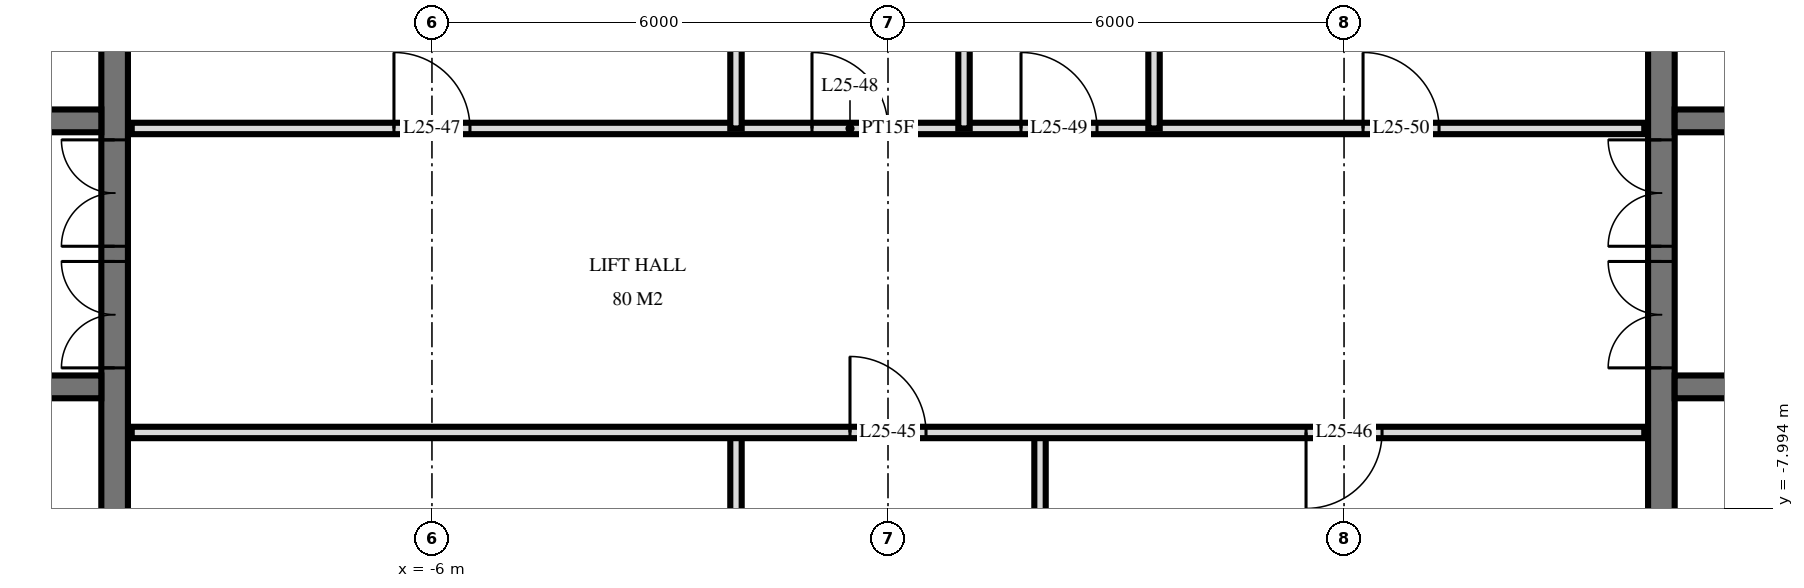
"""IFC4 building model, lengths in metres.
Left out: names, types, materials, properties, quantities, classifications, styles, units other than length and angle.
Written with IfcOpenShell. Run it as: python <this file> out.ifc"""

import sys

from ifc_helpers import new_model, si_unit, direction, frame, frame_2d, origin, place, context, subcontext, project, spatial, rectangle, extrude, element, fill, save


model = new_model("IFC4")
c1 = context("Model", 3, precision=1e-05, world=origin(), true_north=direction((0.0, 1.0)))
c2 = subcontext(c1, "Body", "Model", "MODEL_VIEW")
j1 = project(units=[si_unit("LENGTHUNIT", "METRE"), si_unit("PLANEANGLEUNIT", "RADIAN")], contexts=[c1])
p1 = place(None, origin())
s1 = spatial("IfcSite", under=j1, at=p1, CompositionType="ELEMENT")
p2 = place(p1, origin())
s2 = spatial("IfcBuilding", under=s1, at=p2, CompositionType="ELEMENT")
p3 = place(p2, frame((0.0, 0.0, 99.6)))
s3 = spatial("IfcBuildingStorey", under=s2, at=p3, CompositionType="ELEMENT", Elevation=99.6)
p4 = place(p3, frame((-10.175, -14.55, 0.0), z_axis=(0.0, 0.0, 1.0), x_axis=(0.0, 1.0, 0.0)))
e1 = element("IfcWall", 1, at=p4, inside=s3, PredefinedType="SHEAR", context=c2, shape_type="SweptSolid", body=[
    extrude(rectangle(XDim=14.1, YDim=0.35, at=frame_2d((7.05, 0.0))), origin(), (0.0, 0.0, 1.0), 3.6),
])
p5 = place(p4, frame((8.4, 0.0, 0.0)))
e2 = element("IfcOpeningElement", 2, at=p5, cuts=e1, PredefinedType="OPENING", context=c2, shape_type="SweptSolid", body=[
    extrude(rectangle(XDim=1.4, YDim=2.4, at=frame_2d((0.7, 1.2))), frame((0.0, 0.185, 0.0), z_axis=(0.0, -1.0, 0.0), x_axis=(1.0, 0.0, 0.0)), (0.0, 0.0, 1.0), 0.37),
])
p6 = place(p4, frame((10.0, 0.0, 0.0)))
e3 = element("IfcOpeningElement", 3, at=p6, cuts=e1, PredefinedType="OPENING", context=c2, shape_type="SweptSolid", body=[
    extrude(rectangle(XDim=1.4, YDim=2.4, at=frame_2d((0.7, 1.2))), frame((0.0, 0.185, 0.0), z_axis=(0.0, -1.0, 0.0), x_axis=(1.0, 0.0, 0.0)), (0.0, 0.0, 1.0), 0.37),
])
p7 = place(p4, frame((4.0, 0.0, 0.0)))
e4 = element("IfcOpeningElement", 4, at=p7, cuts=e1, PredefinedType="OPENING", context=c2, shape_type="SweptSolid", body=[
    extrude(rectangle(XDim=1.2, YDim=2.1, at=frame_2d((0.6, 1.05))), frame((0.0, 0.185, 0.0), z_axis=(0.0, -1.0, 0.0), x_axis=(1.0, 0.0, 0.0)), (0.0, 0.0, 1.0), 0.37),
])
p8 = place(p3, frame((-29.05, -2.9, 0.0), z_axis=(0.0, 0.0, 1.0), x_axis=(1.0, 0.0, 0.0)))
e5 = element("IfcWall", 5, at=p8, inside=s3, PredefinedType="SHEAR", context=c2, shape_type="SweptSolid", body=[
    extrude(rectangle(XDim=18.7, YDim=0.3, at=frame_2d((9.35, 0.0))), origin(), (0.0, 0.0, 1.0), 3.6),
])
p9 = place(p8, frame((2.95, 0.0, 0.0)))
e6 = element("IfcOpeningElement", 6, at=p9, cuts=e5, PredefinedType="OPENING", context=c2, shape_type="SweptSolid", body=[
    extrude(rectangle(XDim=1.1, YDim=2.1, at=frame_2d((0.55, 1.05))), frame((0.0, 0.16, 0.0), z_axis=(0.0, -1.0, 0.0), x_axis=(1.0, 0.0, 0.0)), (0.0, 0.0, 1.0), 0.32),
])
p10 = place(p8, frame((0.55, 0.0, 0.0)))
e7 = element("IfcOpeningElement", 7, at=p10, cuts=e5, PredefinedType="OPENING", context=c2, shape_type="SweptSolid", body=[
    extrude(rectangle(XDim=1.1, YDim=2.1, at=frame_2d((0.55, 1.05))), frame((0.0, 0.16, 0.0), z_axis=(0.0, -1.0, 0.0), x_axis=(1.0, 0.0, 0.0)), (0.0, 0.0, 1.0), 0.32),
])
p11 = place(p8, frame((10.9, 0.0, 0.0)))
e8 = element("IfcOpeningElement", 8, at=p11, cuts=e5, PredefinedType="OPENING", context=c2, shape_type="SweptSolid", body=[
    extrude(rectangle(XDim=0.9, YDim=2.1, at=frame_2d((0.45, 1.05))), frame((0.0, 0.16, 0.0), z_axis=(0.0, -1.0, 0.0), x_axis=(1.0, 0.0, 0.0)), (0.0, 0.0, 1.0), 0.32),
])
p12 = place(p8, frame((16.85, 0.0, 0.0)))
e9 = element("IfcOpeningElement", 9, at=p12, cuts=e5, PredefinedType="OPENING", context=c2, shape_type="SweptSolid", body=[
    extrude(rectangle(XDim=1.0, YDim=2.1, at=frame_2d((0.5, 1.05))), frame((0.0, 0.16, 0.0), z_axis=(0.0, -1.0, 0.0), x_axis=(1.0, 0.0, 0.0)), (0.0, 0.0, 1.0), 0.32),
])
p13 = place(p8, frame((13.85, 0.0, 0.0)))
e10 = element("IfcOpeningElement", 10, at=p13, cuts=e5, PredefinedType="OPENING", context=c2, shape_type="SweptSolid", body=[
    extrude(rectangle(XDim=1.0, YDim=2.1, at=frame_2d((0.5, 1.05))), frame((0.0, 0.16, 0.0), z_axis=(0.0, -1.0, 0.0), x_axis=(1.0, 0.0, 0.0)), (0.0, 0.0, 1.0), 0.32),
])
p14 = place(p8, frame((5.6, 0.0, 0.0)))
e11 = element("IfcOpeningElement", 11, at=p14, cuts=e5, PredefinedType="OPENING", context=c2, shape_type="SweptSolid", body=[
    extrude(rectangle(XDim=1.0, YDim=2.1, at=frame_2d((0.5, 1.05))), frame((0.0, 0.16, 0.0), z_axis=(0.0, -1.0, 0.0), x_axis=(1.0, 0.0, 0.0)), (0.0, 0.0, 1.0), 0.32),
])
p15 = place(p3, frame((-29.05, -6.4, 0.0), z_axis=(0.0, 0.0, 1.0), x_axis=(1.0, 0.0, 0.0)))
e12 = element("IfcWall", 12, at=p15, inside=s3, PredefinedType="SHEAR", context=c2, shape_type="SweptSolid", body=[
    extrude(rectangle(XDim=18.7, YDim=0.3, at=frame_2d((9.35, 0.0))), origin(), (0.0, 0.0, 1.0), 3.6),
])
p16 = place(p15, frame((2.95, 0.0, 0.0)))
e13 = element("IfcOpeningElement", 13, at=p16, cuts=e12, PredefinedType="OPENING", context=c2, shape_type="SweptSolid", body=[
    extrude(rectangle(XDim=1.1, YDim=2.1, at=frame_2d((0.55, 1.05))), frame((0.0, 0.16, 0.0), z_axis=(0.0, -1.0, 0.0), x_axis=(1.0, 0.0, 0.0)), (0.0, 0.0, 1.0), 0.32),
])
p17 = place(p15, frame((0.55, 0.0, 0.0)))
e14 = element("IfcOpeningElement", 14, at=p17, cuts=e12, PredefinedType="OPENING", context=c2, shape_type="SweptSolid", body=[
    extrude(rectangle(XDim=1.1, YDim=2.1, at=frame_2d((0.55, 1.05))), frame((0.0, 0.16, 0.0), z_axis=(0.0, -1.0, 0.0), x_axis=(1.0, 0.0, 0.0)), (0.0, 0.0, 1.0), 0.32),
])
p18 = place(p15, frame((10.8, 0.0, 0.0)))
e15 = element("IfcOpeningElement", 15, at=p18, cuts=e12, PredefinedType="OPENING", context=c2, shape_type="SweptSolid", body=[
    extrude(rectangle(XDim=1.1, YDim=2.1, at=frame_2d((0.55, 1.05))), frame((0.0, 0.16, 0.0), z_axis=(0.0, -1.0, 0.0), x_axis=(1.0, 0.0, 0.0)), (0.0, 0.0, 1.0), 0.32),
])
p19 = place(p15, frame((5.6, 0.0, 0.0)))
e16 = element("IfcOpeningElement", 16, at=p19, cuts=e12, PredefinedType="OPENING", context=c2, shape_type="SweptSolid", body=[
    extrude(rectangle(XDim=1.0, YDim=2.1, at=frame_2d((0.5, 1.05))), frame((0.0, 0.16, 0.0), z_axis=(0.0, -1.0, 0.0), x_axis=(1.0, 0.0, 0.0)), (0.0, 0.0, 1.0), 0.32),
])
p20 = place(p3, frame((10.175, -14.55, 0.0), z_axis=(0.0, 0.0, 1.0), x_axis=(0.0, 1.0, 0.0)))
e17 = element("IfcWall", 17, at=p20, inside=s3, PredefinedType="SHEAR", context=c2, shape_type="SweptSolid", body=[
    extrude(rectangle(XDim=14.1, YDim=0.35, at=frame_2d((7.05, 0.0))), origin(), (0.0, 0.0, 1.0), 3.6),
])
p21 = place(p20, frame((8.4, 0.0, 0.0)))
e18 = element("IfcOpeningElement", 18, at=p21, cuts=e17, PredefinedType="OPENING", context=c2, shape_type="SweptSolid", body=[
    extrude(rectangle(XDim=1.4, YDim=2.4, at=frame_2d((0.7, 1.2))), frame((0.0, 0.185, 0.0), z_axis=(0.0, -1.0, 0.0), x_axis=(1.0, 0.0, 0.0)), (0.0, 0.0, 1.0), 0.37),
])
p22 = place(p20, frame((10.0, 0.0, 0.0)))
e19 = element("IfcOpeningElement", 19, at=p22, cuts=e17, PredefinedType="OPENING", context=c2, shape_type="SweptSolid", body=[
    extrude(rectangle(XDim=1.4, YDim=2.4, at=frame_2d((0.7, 1.2))), frame((0.0, 0.185, 0.0), z_axis=(0.0, -1.0, 0.0), x_axis=(1.0, 0.0, 0.0)), (0.0, 0.0, 1.0), 0.37),
])
p23 = place(p20, frame((4.0, 0.0, 0.0)))
e20 = element("IfcOpeningElement", 20, at=p23, cuts=e17, PredefinedType="OPENING", context=c2, shape_type="SweptSolid", body=[
    extrude(rectangle(XDim=1.2, YDim=2.1, at=frame_2d((0.6, 1.05))), frame((0.0, 0.185, 0.0), z_axis=(0.0, -1.0, 0.0), x_axis=(1.0, 0.0, 0.0)), (0.0, 0.0, 1.0), 0.37),
])
p24 = place(p3, frame((10.35, -2.9, 0.0), z_axis=(0.0, 0.0, 1.0), x_axis=(1.0, 0.0, 0.0)))
e21 = element("IfcWall", 21, at=p24, inside=s3, PredefinedType="SHEAR", context=c2, shape_type="SweptSolid", body=[
    extrude(rectangle(XDim=18.7, YDim=0.3, at=frame_2d((9.35, 0.0))), origin(), (0.0, 0.0, 1.0), 3.6),
])
p25 = place(p24, frame((14.65, 0.0, 0.0)))
e22 = element("IfcOpeningElement", 22, at=p25, cuts=e21, PredefinedType="OPENING", context=c2, shape_type="SweptSolid", body=[
    extrude(rectangle(XDim=1.1, YDim=2.1, at=frame_2d((0.55, 1.05))), frame((0.0, 0.16, 0.0), z_axis=(0.0, -1.0, 0.0), x_axis=(1.0, 0.0, 0.0)), (0.0, 0.0, 1.0), 0.32),
])
p26 = place(p24, frame((17.05, 0.0, 0.0)))
e23 = element("IfcOpeningElement", 23, at=p26, cuts=e21, PredefinedType="OPENING", context=c2, shape_type="SweptSolid", body=[
    extrude(rectangle(XDim=1.1, YDim=2.1, at=frame_2d((0.55, 1.05))), frame((0.0, 0.16, 0.0), z_axis=(0.0, -1.0, 0.0), x_axis=(1.0, 0.0, 0.0)), (0.0, 0.0, 1.0), 0.32),
])
p27 = place(p24, frame((6.9, 0.0, 0.0)))
e24 = element("IfcOpeningElement", 24, at=p27, cuts=e21, PredefinedType="OPENING", context=c2, shape_type="SweptSolid", body=[
    extrude(rectangle(XDim=0.9, YDim=2.1, at=frame_2d((0.45, 1.05))), frame((0.0, 0.16, 0.0), z_axis=(0.0, -1.0, 0.0), x_axis=(1.0, 0.0, 0.0)), (0.0, 0.0, 1.0), 0.32),
])
p28 = place(p24, frame((0.85, 0.0, 0.0)))
e25 = element("IfcOpeningElement", 25, at=p28, cuts=e21, PredefinedType="OPENING", context=c2, shape_type="SweptSolid", body=[
    extrude(rectangle(XDim=1.0, YDim=2.1, at=frame_2d((0.5, 1.05))), frame((0.0, 0.16, 0.0), z_axis=(0.0, -1.0, 0.0), x_axis=(1.0, 0.0, 0.0)), (0.0, 0.0, 1.0), 0.32),
])
p29 = place(p24, frame((3.85, 0.0, 0.0)))
e26 = element("IfcOpeningElement", 26, at=p29, cuts=e21, PredefinedType="OPENING", context=c2, shape_type="SweptSolid", body=[
    extrude(rectangle(XDim=1.0, YDim=2.1, at=frame_2d((0.5, 1.05))), frame((0.0, 0.16, 0.0), z_axis=(0.0, -1.0, 0.0), x_axis=(1.0, 0.0, 0.0)), (0.0, 0.0, 1.0), 0.32),
])
p30 = place(p24, frame((12.1, 0.0, 0.0)))
e27 = element("IfcOpeningElement", 27, at=p30, cuts=e21, PredefinedType="OPENING", context=c2, shape_type="SweptSolid", body=[
    extrude(rectangle(XDim=1.0, YDim=2.1, at=frame_2d((0.5, 1.05))), frame((0.0, 0.16, 0.0), z_axis=(0.0, -1.0, 0.0), x_axis=(1.0, 0.0, 0.0)), (0.0, 0.0, 1.0), 0.32),
])
p31 = place(p3, frame((10.35, -6.4, 0.0), z_axis=(0.0, 0.0, 1.0), x_axis=(1.0, 0.0, 0.0)))
e28 = element("IfcWall", 28, at=p31, inside=s3, PredefinedType="SHEAR", context=c2, shape_type="SweptSolid", body=[
    extrude(rectangle(XDim=18.7, YDim=0.3, at=frame_2d((9.35, 0.0))), origin(), (0.0, 0.0, 1.0), 3.6),
])
p32 = place(p31, frame((14.65, 0.0, 0.0)))
e29 = element("IfcOpeningElement", 29, at=p32, cuts=e28, PredefinedType="OPENING", context=c2, shape_type="SweptSolid", body=[
    extrude(rectangle(XDim=1.1, YDim=2.1, at=frame_2d((0.55, 1.05))), frame((0.0, 0.16, 0.0), z_axis=(0.0, -1.0, 0.0), x_axis=(1.0, 0.0, 0.0)), (0.0, 0.0, 1.0), 0.32),
])
p33 = place(p31, frame((17.05, 0.0, 0.0)))
e30 = element("IfcOpeningElement", 30, at=p33, cuts=e28, PredefinedType="OPENING", context=c2, shape_type="SweptSolid", body=[
    extrude(rectangle(XDim=1.1, YDim=2.1, at=frame_2d((0.55, 1.05))), frame((0.0, 0.16, 0.0), z_axis=(0.0, -1.0, 0.0), x_axis=(1.0, 0.0, 0.0)), (0.0, 0.0, 1.0), 0.32),
])
p34 = place(p31, frame((6.8, 0.0, 0.0)))
e31 = element("IfcOpeningElement", 31, at=p34, cuts=e28, PredefinedType="OPENING", context=c2, shape_type="SweptSolid", body=[
    extrude(rectangle(XDim=1.1, YDim=2.1, at=frame_2d((0.55, 1.05))), frame((0.0, 0.16, 0.0), z_axis=(0.0, -1.0, 0.0), x_axis=(1.0, 0.0, 0.0)), (0.0, 0.0, 1.0), 0.32),
])
p35 = place(p31, frame((12.1, 0.0, 0.0)))
e32 = element("IfcOpeningElement", 32, at=p35, cuts=e28, PredefinedType="OPENING", context=c2, shape_type="SweptSolid", body=[
    extrude(rectangle(XDim=1.0, YDim=2.1, at=frame_2d((0.5, 1.05))), frame((0.0, 0.16, 0.0), z_axis=(0.0, -1.0, 0.0), x_axis=(1.0, 0.0, 0.0)), (0.0, 0.0, 1.0), 0.32),
])
p36 = place(p3, frame((3.5, -3.0, 0.0), z_axis=(0.0, 0.0, 1.0), x_axis=(0.0, 1.0, 0.0)))
e33 = element("IfcWall", 33, at=p36, inside=s3, PredefinedType="PLUMBINGWALL", context=c2, shape_type="SweptSolid", body=[
    extrude(rectangle(XDim=4.02, YDim=0.15, at=frame_2d((2.01, 0.0))), origin(), (0.0, 0.0, 1.0), 3.32),
])
p37 = place(p3, frame((2.0, -11.0, 0.0), z_axis=(0.0, 0.0, 1.0), x_axis=(0.0, 1.0, 0.0)))
e34 = element("IfcWall", 34, at=p37, inside=s3, PredefinedType="PARTITIONING", context=c2, shape_type="SweptSolid", body=[
    extrude(rectangle(XDim=4.0, YDim=0.15, at=frame_2d((2.0, 0.0))), origin(), (0.0, 0.0, 1.0), 3.32),
])
p38 = place(p3, frame((1.0, -3.0, 0.0), z_axis=(0.0, 0.0, 1.0), x_axis=(0.0, 1.0, 0.0)))
e35 = element("IfcWall", 35, at=p38, inside=s3, PredefinedType="PLUMBINGWALL", context=c2, shape_type="SweptSolid", body=[
    extrude(rectangle(XDim=4.02, YDim=0.15, at=frame_2d((2.01, 0.0))), origin(), (0.0, 0.0, 1.0), 3.32),
])
p39 = place(p3, frame((-2.0, -11.0, 0.0), z_axis=(0.0, 0.0, 1.0), x_axis=(0.0, 1.0, 0.0)))
e36 = element("IfcWall", 36, at=p39, inside=s3, PredefinedType="PARTITIONING", context=c2, shape_type="SweptSolid", body=[
    extrude(rectangle(XDim=4.0, YDim=0.15, at=frame_2d((2.0, 0.0))), origin(), (0.0, 0.0, 1.0), 3.32),
])
p40 = place(p3, frame((-2.0, -3.0, 0.0), z_axis=(0.0, 0.0, 1.0), x_axis=(0.0, 1.0, 0.0)))
e37 = element("IfcWall", 37, at=p40, inside=s3, PredefinedType="PLUMBINGWALL", context=c2, shape_type="SweptSolid", body=[
    extrude(rectangle(XDim=4.02, YDim=0.15, at=frame_2d((2.01, 0.0))), origin(), (0.0, 0.0, 1.0), 3.32),
])
p41 = place(p3, frame((-9.95, -7.0, 0.0), z_axis=(0.0, 0.0, 1.0), x_axis=(1.0, 0.0, 0.0)))
e38 = element("IfcWall", 38, at=p41, inside=s3, PredefinedType="PARTITIONING", context=c2, shape_type="SweptSolid", body=[
    extrude(rectangle(XDim=19.9, YDim=0.15, at=frame_2d((9.95, 0.0))), origin(), (0.0, 0.0, 1.0), 3.32),
])
p42 = place(p41, frame((9.45, 0.0, 0.0)))
e39 = element("IfcOpeningElement", 39, at=p42, cuts=e38, PredefinedType="OPENING", context=c2, shape_type="SweptSolid", body=[
    extrude(rectangle(XDim=1.0, YDim=2.1, at=frame_2d((0.5, 1.05))), frame((0.0, 0.085, 0.0), z_axis=(0.0, -1.0, 0.0), x_axis=(1.0, 0.0, 0.0)), (0.0, 0.0, 1.0), 0.17),
])
p43 = place(p41, frame((15.45, 0.0, 0.0)))
e40 = element("IfcOpeningElement", 40, at=p43, cuts=e38, PredefinedType="OPENING", context=c2, shape_type="SweptSolid", body=[
    extrude(rectangle(XDim=1.0, YDim=2.1, at=frame_2d((0.5, 1.05))), frame((0.0, 0.085, 0.0), z_axis=(0.0, -1.0, 0.0), x_axis=(1.0, 0.0, 0.0)), (0.0, 0.0, 1.0), 0.17),
])
p44 = place(p3, frame((-9.95, -3.0, 0.0), z_axis=(0.0, 0.0, 1.0), x_axis=(1.0, 0.0, 0.0)))
e41 = element("IfcWall", 41, at=p44, inside=s3, PredefinedType="PARTITIONING", context=c2, shape_type="SweptSolid", body=[
    extrude(rectangle(XDim=19.9, YDim=0.15, at=frame_2d((9.95, 0.0))), origin(), (0.0, 0.0, 1.0), 3.32),
])
p45 = place(p44, frame((3.45, 0.0, 0.0)))
e42 = element("IfcOpeningElement", 42, at=p45, cuts=e41, PredefinedType="OPENING", context=c2, shape_type="SweptSolid", body=[
    extrude(rectangle(XDim=1.0, YDim=2.1, at=frame_2d((0.5, 1.05))), frame((0.0, 0.085, 0.0), z_axis=(0.0, -1.0, 0.0), x_axis=(1.0, 0.0, 0.0)), (0.0, 0.0, 1.0), 0.17),
])
p46 = place(p44, frame((8.95, 0.0, 0.0)))
e43 = element("IfcOpeningElement", 43, at=p46, cuts=e41, PredefinedType="OPENING", context=c2, shape_type="SweptSolid", body=[
    extrude(rectangle(XDim=1.0, YDim=2.1, at=frame_2d((0.5, 1.05))), frame((0.0, 0.085, 0.0), z_axis=(0.0, -1.0, 0.0), x_axis=(1.0, 0.0, 0.0)), (0.0, 0.0, 1.0), 0.17),
])
p47 = place(p44, frame((11.7, 0.0, 0.0)))
e44 = element("IfcOpeningElement", 44, at=p47, cuts=e41, PredefinedType="OPENING", context=c2, shape_type="SweptSolid", body=[
    extrude(rectangle(XDim=1.0, YDim=2.1, at=frame_2d((0.5, 1.05))), frame((0.0, 0.085, 0.0), z_axis=(0.0, -1.0, 0.0), x_axis=(1.0, 0.0, 0.0)), (0.0, 0.0, 1.0), 0.17),
])
p48 = place(p44, frame((16.2, 0.0, 0.0)))
e45 = element("IfcOpeningElement", 45, at=p48, cuts=e41, PredefinedType="OPENING", context=c2, shape_type="SweptSolid", body=[
    extrude(rectangle(XDim=1.0, YDim=2.1, at=frame_2d((0.5, 1.05))), frame((0.0, 0.085, 0.0), z_axis=(0.0, -1.0, 0.0), x_axis=(1.0, 0.0, 0.0)), (0.0, 0.0, 1.0), 0.17),
])
p49 = place(p5, origin())
e46 = element("IfcDoor", 46, at=p49, inside=s3, OperationType="DOUBLE_DOOR_SINGLE_SWING", PredefinedType="DOOR", context=c2, shape_type="SweptSolid", body=[
    extrude(rectangle(XDim=1.4, YDim=2.4, at=frame_2d((0.7, 1.2))), frame((0.0, 0.025, 0.0), z_axis=(0.0, -1.0, 0.0), x_axis=(1.0, 0.0, 0.0)), (0.0, 0.0, 1.0), 0.05),
])
fill(e2, e46)
p50 = place(p6, origin())
e47 = element("IfcDoor", 47, at=p50, inside=s3, OperationType="DOUBLE_DOOR_SINGLE_SWING", PredefinedType="DOOR", context=c2, shape_type="SweptSolid", body=[
    extrude(rectangle(XDim=1.4, YDim=2.4, at=frame_2d((0.7, 1.2))), frame((0.0, 0.025, 0.0), z_axis=(0.0, -1.0, 0.0), x_axis=(1.0, 0.0, 0.0)), (0.0, 0.0, 1.0), 0.05),
])
fill(e3, e47)
p51 = place(p21, origin())
e48 = element("IfcDoor", 48, at=p51, inside=s3, OperationType="DOUBLE_DOOR_SINGLE_SWING", PredefinedType="DOOR", context=c2, shape_type="SweptSolid", body=[
    extrude(rectangle(XDim=1.4, YDim=2.4, at=frame_2d((0.7, 1.2))), frame((0.0, 0.025, 0.0), z_axis=(0.0, -1.0, 0.0), x_axis=(1.0, 0.0, 0.0)), (0.0, 0.0, 1.0), 0.05),
])
fill(e18, e48)
p52 = place(p22, origin())
e49 = element("IfcDoor", 49, at=p52, inside=s3, OperationType="DOUBLE_DOOR_SINGLE_SWING", PredefinedType="DOOR", context=c2, shape_type="SweptSolid", body=[
    extrude(rectangle(XDim=1.4, YDim=2.4, at=frame_2d((0.7, 1.2))), frame((0.0, 0.025, 0.0), z_axis=(0.0, -1.0, 0.0), x_axis=(1.0, 0.0, 0.0)), (0.0, 0.0, 1.0), 0.05),
])
fill(e19, e49)
p53 = place(p42, origin())
e50 = element("IfcDoor", 50, at=p53, inside=s3, OperationType="SINGLE_SWING_RIGHT", PredefinedType="DOOR", context=c2, shape_type="SweptSolid", body=[
    extrude(rectangle(XDim=1.0, YDim=2.1, at=frame_2d((0.5, 1.05))), frame((0.0, 0.025, 0.0), z_axis=(0.0, -1.0, 0.0), x_axis=(1.0, 0.0, 0.0)), (0.0, 0.0, 1.0), 0.05),
])
fill(e39, e50)
p54 = place(p43, frame((0.5, 0.0, 0.0), z_axis=(0.0, 0.0, 1.0), x_axis=(-1.0, 0.0, 0.0)))
e51 = element("IfcDoor", 51, at=p54, inside=s3, OperationType="SINGLE_SWING_LEFT", PredefinedType="DOOR", context=c2, shape_type="SweptSolid", body=[
    extrude(rectangle(XDim=1.0, YDim=2.1, at=frame_2d((0.0, 1.05))), frame((0.0, -0.025, 0.0), z_axis=(0.0, 1.0, 0.0), x_axis=(-1.0, 0.0, 0.0)), (0.0, 0.0, 1.0), 0.05),
])
fill(e40, e51)
p55 = place(p45, origin())
e52 = element("IfcDoor", 52, at=p55, inside=s3, OperationType="SINGLE_SWING_RIGHT", PredefinedType="DOOR", context=c2, shape_type="SweptSolid", body=[
    extrude(rectangle(XDim=1.0, YDim=2.1, at=frame_2d((0.5, 1.05))), frame((0.0, 0.025, 0.0), z_axis=(0.0, -1.0, 0.0), x_axis=(1.0, 0.0, 0.0)), (0.0, 0.0, 1.0), 0.05),
])
fill(e42, e52)
p56 = place(p46, origin())
e53 = element("IfcDoor", 53, at=p56, inside=s3, OperationType="SINGLE_SWING_RIGHT", PredefinedType="DOOR", context=c2, shape_type="SweptSolid", body=[
    extrude(rectangle(XDim=1.0, YDim=2.1, at=frame_2d((0.5, 1.05))), frame((0.0, 0.025, 0.0), z_axis=(0.0, -1.0, 0.0), x_axis=(1.0, 0.0, 0.0)), (0.0, 0.0, 1.0), 0.05),
])
fill(e43, e53)
p57 = place(p47, origin())
e54 = element("IfcDoor", 54, at=p57, inside=s3, OperationType="SINGLE_SWING_RIGHT", PredefinedType="DOOR", context=c2, shape_type="SweptSolid", body=[
    extrude(rectangle(XDim=1.0, YDim=2.1, at=frame_2d((0.5, 1.05))), frame((0.0, 0.025, 0.0), z_axis=(0.0, -1.0, 0.0), x_axis=(1.0, 0.0, 0.0)), (0.0, 0.0, 1.0), 0.05),
])
fill(e44, e54)
p58 = place(p48, origin())
e55 = element("IfcDoor", 55, at=p58, inside=s3, OperationType="SINGLE_SWING_RIGHT", PredefinedType="DOOR", context=c2, shape_type="SweptSolid", body=[
    extrude(rectangle(XDim=1.0, YDim=2.1, at=frame_2d((0.5, 1.05))), frame((0.0, 0.025, 0.0), z_axis=(0.0, -1.0, 0.0), x_axis=(1.0, 0.0, 0.0)), (0.0, 0.0, 1.0), 0.05),
])
fill(e45, e55)
save(model, sys.argv[1])
